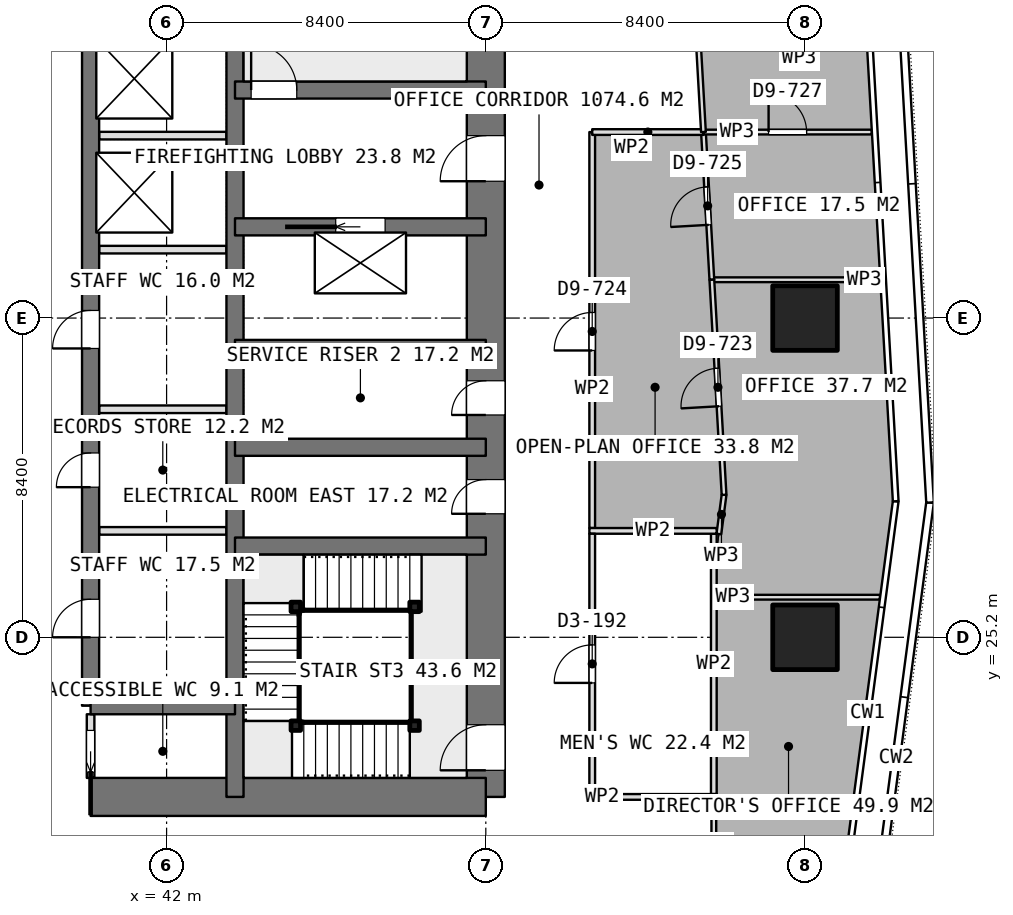
"""IFC4 building model, lengths in metres.
Left out: names, types, materials, properties, quantities, classifications, styles, units other than length and angle.
Written with IfcOpenShell. Run it as: python <this file> out.ifc"""

import sys

from ifc_helpers import new_model, si_unit, direction, frame, frame_2d, origin, origin_2d, place, context, subcontext, project, spatial, rectangle, extrude, element, fill, save


model = new_model("IFC4")
c1 = context("Model", 3, precision=1e-05, world=origin(), true_north=direction((0.0, 1.0)))
c2 = subcontext(c1, "Body", "Model", "MODEL_VIEW")
j1 = project(units=[si_unit("LENGTHUNIT", "METRE"), si_unit("PLANEANGLEUNIT", "RADIAN")], contexts=[c1])
p1 = place(None, origin())
s1 = spatial("IfcSite", under=j1, at=p1, CompositionType="ELEMENT")
p2 = place(p1, origin())
s2 = spatial("IfcBuilding", under=s1, at=p2, CompositionType="ELEMENT")
p3 = place(p2, frame((0.0, 0.0, 183.95)))
s3 = spatial("IfcBuildingStorey", under=s2, at=p3, CompositionType="ELEMENT", Elevation=183.95)
p4 = place(p3, frame((40.0, 21.0, 0.0), z_axis=(0.0, 0.0, 1.0), x_axis=(1.0, 0.0, 0.0)))
e1 = element("IfcWall", 1, at=p4, inside=s3, PredefinedType="SHEAR", context=c2, shape_type="SweptSolid", body=[
    extrude(rectangle(XDim=10.4, YDim=1.0, at=frame_2d((5.2, 0.0))), origin(), (0.0, 0.0, 1.0), 3.75),
])
p5 = place(p3, frame((50.4, 21.0, 0.0), z_axis=(0.0, 0.0, 1.0), x_axis=(0.0, 1.0, 0.0)))
e2 = element("IfcWall", 2, at=p5, inside=s3, PredefinedType="SHEAR", context=c2, shape_type="SweptSolid", body=[
    extrude(rectangle(XDim=25.2, YDim=1.0, at=frame_2d((12.6, 0.0))), origin(), (0.0, 0.0, 1.0), 3.75),
])
p6 = place(p5, frame((16.2, 0.0, 0.0)))
e3 = element("IfcOpeningElement", 3, at=p6, cuts=e2, PredefinedType="OPENING", context=c2, shape_type="SweptSolid", body=[
    extrude(rectangle(XDim=1.2, YDim=2.1, at=frame_2d((0.6, 1.05))), frame((0.0, 0.51, 0.0), z_axis=(0.0, -1.0, 0.0), x_axis=(1.0, 0.0, 0.0)), (0.0, 0.0, 1.0), 1.02),
])
p7 = place(p5, frame((10.05, 0.0, 0.0)))
e4 = element("IfcOpeningElement", 4, at=p7, cuts=e2, PredefinedType="OPENING", context=c2, shape_type="SweptSolid", body=[
    extrude(rectangle(XDim=0.9, YDim=2.1, at=frame_2d((0.45, 1.05))), frame((0.0, 0.51, 0.0), z_axis=(0.0, -1.0, 0.0), x_axis=(1.0, 0.0, 0.0)), (0.0, 0.0, 1.0), 1.02),
])
p8 = place(p5, frame((7.45, 0.0, 0.0)))
e5 = element("IfcOpeningElement", 5, at=p8, cuts=e2, PredefinedType="OPENING", context=c2, shape_type="SweptSolid", body=[
    extrude(rectangle(XDim=0.9, YDim=2.1, at=frame_2d((0.45, 1.05))), frame((0.0, 0.51, 0.0), z_axis=(0.0, -1.0, 0.0), x_axis=(1.0, 0.0, 0.0)), (0.0, 0.0, 1.0), 1.02),
])
p9 = place(p5, frame((0.7, 0.0, 0.0)))
e6 = element("IfcOpeningElement", 6, at=p9, cuts=e2, PredefinedType="OPENING", context=c2, shape_type="SweptSolid", body=[
    extrude(rectangle(XDim=1.2, YDim=2.1, at=frame_2d((0.6, 1.05))), frame((0.0, 0.51, 0.0), z_axis=(0.0, -1.0, 0.0), x_axis=(1.0, 0.0, 0.0)), (0.0, 0.0, 1.0), 1.02),
])
p10 = place(p3, frame((43.8, 21.0, 0.0), z_axis=(0.0, 0.0, 1.0), x_axis=(0.0, 1.0, 0.0)))
e7 = element("IfcWall", 7, at=p10, inside=s3, PredefinedType="SHEAR", context=c2, shape_type="SweptSolid", body=[
    extrude(rectangle(XDim=25.2, YDim=0.45, at=frame_2d((12.6, 0.0))), origin(), (0.0, 0.0, 1.0), 3.75),
])
p11 = place(p3, frame((40.0, 23.4, 0.0), z_axis=(0.0, 0.0, 1.0), x_axis=(0.0, 1.0, 0.0)))
e8 = element("IfcWall", 8, at=p11, inside=s3, PredefinedType="SHEAR", context=c2, shape_type="SweptSolid", body=[
    extrude(rectangle(XDim=18.0, YDim=0.45, at=frame_2d((9.0, 0.0))), origin(), (0.0, 0.0, 1.0), 3.75),
])
p12 = place(p11, frame((1.8, 0.0, 0.0)))
e9 = element("IfcOpeningElement", 9, at=p12, cuts=e8, PredefinedType="OPENING", context=c2, shape_type="SweptSolid", body=[
    extrude(rectangle(XDim=1.0, YDim=2.1, at=frame_2d((0.5, 1.05))), frame((0.0, 0.235, 0.0), z_axis=(0.0, -1.0, 0.0), x_axis=(1.0, 0.0, 0.0)), (0.0, 0.0, 1.0), 0.47),
])
p13 = place(p11, frame((5.75, 0.0, 0.0)))
e10 = element("IfcOpeningElement", 10, at=p13, cuts=e8, PredefinedType="OPENING", context=c2, shape_type="SweptSolid", body=[
    extrude(rectangle(XDim=0.9, YDim=2.1, at=frame_2d((0.45, 1.05))), frame((0.0, 0.235, 0.0), z_axis=(0.0, -1.0, 0.0), x_axis=(1.0, 0.0, 0.0)), (0.0, 0.0, 1.0), 0.47),
])
p14 = place(p11, frame((9.4, 0.0, 0.0)))
e11 = element("IfcOpeningElement", 11, at=p14, cuts=e8, PredefinedType="OPENING", context=c2, shape_type="SweptSolid", body=[
    extrude(rectangle(XDim=1.0, YDim=2.1, at=frame_2d((0.5, 1.05))), frame((0.0, 0.235, 0.0), z_axis=(0.0, -1.0, 0.0), x_axis=(1.0, 0.0, 0.0)), (0.0, 0.0, 1.0), 0.47),
])
p15 = place(p3, frame((40.0, 23.4, 0.0), z_axis=(0.0, 0.0, 1.0), x_axis=(1.0, 0.0, 0.0)))
e12 = element("IfcWall", 12, at=p15, inside=s3, PredefinedType="SHEAR", context=c2, shape_type="SweptSolid", body=[
    extrude(rectangle(XDim=3.8, YDim=0.45, at=frame_2d((1.9, 0.0))), origin(), (0.0, 0.0, 1.0), 3.75),
])
for number, where, z_axis, x_axis in (
    (13, (43.8, 27.6, 0.0), (0.0, 0.0, 1.0), (1.0, 0.0, 0.0)),
    (14, (43.8, 30.2, 0.0), (0.0, 0.0, 1.0), (1.0, 0.0, 0.0)),
    (15, (43.8, 32.8, 0.0), (0.0, 0.0, 1.0), (1.0, 0.0, 0.0)),
):
    element("IfcWall", number, at=place(p3, frame(where, z_axis=z_axis, x_axis=x_axis)), inside=s3, PredefinedType="SHEAR", context=c2, shape_type="SweptSolid", body=[
        extrude(rectangle(XDim=6.6, YDim=0.45, at=frame_2d((3.3, 0.0))), origin(), (0.0, 0.0, 1.0), 3.75),
    ])
p16 = place(p3, frame((43.8, 36.0, 0.0), z_axis=(0.0, 0.0, 1.0), x_axis=(1.0, 0.0, 0.0)))
e16 = element("IfcWall", 16, at=p16, inside=s3, PredefinedType="SHEAR", context=c2, shape_type="SweptSolid", body=[
    extrude(rectangle(XDim=6.6, YDim=0.45, at=frame_2d((3.3, 0.0))), origin(), (0.0, 0.0, 1.0), 3.75),
])
p17 = place(p16, frame((2.65, 0.0, 0.0)))
e17 = element("IfcOpeningElement", 17, at=p17, cuts=e16, PredefinedType="OPENING", context=c2, shape_type="SweptSolid", body=[
    extrude(rectangle(XDim=1.3, YDim=2.1, at=frame_2d((0.65, 1.05))), frame((0.0, 0.235, 0.0), z_axis=(0.0, -1.0, 0.0), x_axis=(1.0, 0.0, 0.0)), (0.0, 0.0, 1.0), 0.47),
])
p18 = place(p3, frame((43.8, 39.6, 0.0), z_axis=(0.0, 0.0, 1.0), x_axis=(1.0, 0.0, 0.0)))
e18 = element("IfcWall", 18, at=p18, inside=s3, PredefinedType="SHEAR", context=c2, shape_type="SweptSolid", body=[
    extrude(rectangle(XDim=6.6, YDim=0.45, at=frame_2d((3.3, 0.0))), origin(), (0.0, 0.0, 1.0), 3.75),
])
p19 = place(p18, frame((0.425, 0.0, 0.0)))
e19 = element("IfcOpeningElement", 19, at=p19, cuts=e18, PredefinedType="OPENING", context=c2, shape_type="SweptSolid", body=[
    extrude(rectangle(XDim=1.2, YDim=2.1, at=frame_2d((0.6, 1.05))), frame((0.0, 0.235, 0.0), z_axis=(0.0, -1.0, 0.0), x_axis=(1.0, 0.0, 0.0)), (0.0, 0.0, 1.0), 0.47),
])
for number, where, z_axis, x_axis in (
    (20, (58.8, 25.2, 0.0), (0.0, 0.0, 1.0), (1.0, 0.0, 0.0)),
    (21, (58.8, 33.6, 0.0), (0.0, 0.0, 1.0), (1.0, 0.0, 0.0)),
):
    element("IfcColumn", number, at=place(p3, frame(where, z_axis=z_axis, x_axis=x_axis)), inside=s3, PredefinedType="COLUMN", context=c2, shape_type="SweptSolid", body=[
        extrude(rectangle(XDim=1.7, YDim=1.7, at=origin_2d()), origin(), (0.0, 0.0, 1.0), 3.75),
    ])
for number, where, z_axis, x_axis in (
    (22, (40.225, 35.4, 0.0), (0.0, 0.0, 1.0), (1.0, 0.0, 0.0)),
    (23, (40.225, 38.4, 0.0), (0.0, 0.0, 1.0), (1.0, 0.0, 0.0)),
):
    element("IfcWall", number, at=place(p3, frame(where, z_axis=z_axis, x_axis=x_axis)), inside=s3, PredefinedType="PARTITIONING", context=c2, shape_type="SweptSolid", body=[
        extrude(rectangle(XDim=3.35, YDim=0.2, at=frame_2d((1.675, 0.0))), origin(), (0.0, 0.0, 1.0), 3.5),
    ])
p20 = place(p3, frame((40.0, 21.5, 0.0), z_axis=(0.0, 0.0, 1.0), x_axis=(0.0, 1.0, 0.0)))
e24 = element("IfcWall", 24, at=p20, inside=s3, PredefinedType="PARTITIONING", context=c2, shape_type="SweptSolid", body=[
    extrude(rectangle(XDim=1.675, YDim=0.2, at=frame_2d((0.837, 0.0))), origin(), (0.0, 0.0, 1.0), 3.5),
])
p21 = place(p20, frame((0.15, 0.0, 0.0)))
e25 = element("IfcOpeningElement", 25, at=p21, cuts=e24, PredefinedType="OPENING", context=c2, shape_type="SweptSolid", body=[
    extrude(rectangle(XDim=1.1, YDim=2.1, at=frame_2d((0.55, 1.05))), frame((0.0, 0.11, 0.0), z_axis=(0.0, -1.0, 0.0), x_axis=(1.0, 0.0, 0.0)), (0.0, 0.0, 1.0), 0.22),
])
for number, where, z_axis, x_axis in (
    (26, (40.225, 28.0, 0.0), (0.0, 0.0, 1.0), (1.0, 0.0, 0.0)),
    (27, (40.225, 31.2, 0.0), (0.0, 0.0, 1.0), (1.0, 0.0, 0.0)),
):
    element("IfcWall", number, at=place(p3, frame(where, z_axis=z_axis, x_axis=x_axis)), inside=s3, PredefinedType="PARTITIONING", context=c2, shape_type="SweptSolid", body=[
        extrude(rectangle(XDim=3.35, YDim=0.2, at=frame_2d((1.675, 0.0))), origin(), (0.0, 0.0, 1.0), 3.5),
    ])
for number, where, z_axis, x_axis in (
    (28, (53.125, 21.0, 0.0), (0.0, 0.0, 1.0), (1.0, 0.0, 0.0)),
    (29, (53.125, 28.0, 0.0), (0.0, 0.0, 1.0), (1.0, 0.0, 0.0)),
):
    element("IfcWall", number, at=place(p3, frame(where, z_axis=z_axis, x_axis=x_axis)), inside=s3, PredefinedType="PARTITIONING", context=c2, shape_type="SweptSolid", body=[
        extrude(rectangle(XDim=3.35, YDim=0.15, at=frame_2d((1.675, 0.0))), origin(), (0.0, 0.0, 1.0), 3.5),
    ])
p22 = place(p3, frame((53.2, 21.075, 0.0), z_axis=(0.0, 0.0, 1.0), x_axis=(0.0, 1.0, 0.0)))
e30 = element("IfcWall", 30, at=p22, inside=s3, PredefinedType="PARTITIONING", context=c2, shape_type="SweptSolid", body=[
    extrude(rectangle(XDim=6.85, YDim=0.15, at=frame_2d((3.425, 0.0))), origin(), (0.0, 0.0, 1.0), 3.5),
])
p23 = place(p22, frame((2.925, 0.0, 0.0)))
e31 = element("IfcOpeningElement", 31, at=p23, cuts=e30, PredefinedType="OPENING", context=c2, shape_type="SweptSolid", body=[
    extrude(rectangle(XDim=1.0, YDim=2.1, at=frame_2d((0.5, 1.05))), frame((0.0, 0.085, 0.0), z_axis=(0.0, -1.0, 0.0), x_axis=(1.0, 0.0, 0.0)), (0.0, 0.0, 1.0), 0.17),
])
p24 = place(p3, frame((56.4, 21.075, 0.0), z_axis=(0.0, 0.0, 1.0), x_axis=(0.0, 1.0, 0.0)))
e32 = element("IfcWall", 32, at=p24, inside=s3, PredefinedType="PARTITIONING", context=c2, shape_type="SweptSolid", body=[
    extrude(rectangle(XDim=6.85, YDim=0.15, at=frame_2d((3.425, 0.0))), origin(), (0.0, 0.0, 1.0), 3.5),
])
p25 = place(p3, frame((56.4, 18.4, 0.0), z_axis=(0.0, 0.0, 1.0), x_axis=(0.0, 1.0, 0.0)))
e33 = element("IfcWall", 33, at=p25, inside=s3, PredefinedType="PARTITIONING", context=c2, shape_type="SweptSolid", body=[
    extrude(rectangle(XDim=2.675, YDim=0.125, at=frame_2d((1.337, 0.0))), origin(), (0.0, 0.0, 1.0), 3.5),
])
p26 = place(p3, frame((56.475, 26.255, 0.0), z_axis=(0.0, 0.0, 1.0), x_axis=(1.0, 0.0, 0.0)))
e34 = element("IfcWall", 34, at=p26, inside=s3, PredefinedType="PARTITIONING", context=c2, shape_type="SweptSolid", body=[
    extrude(rectangle(XDim=4.296, YDim=0.125, at=frame_2d((2.148, 0.0))), origin(), (0.0, 0.0, 1.0), 3.5),
])
p27 = place(p3, frame((56.669, 28.949, 0.0), z_axis=(0.0, 0.0, 1.0), x_axis=(-0.05664130847, 0.998394592421, 0.0)))
e35 = element("IfcWall", 35, at=p27, inside=s3, PredefinedType="PARTITIONING", context=c2, shape_type="SweptSolid", body=[
    extrude(rectangle(XDim=5.668, YDim=0.125, at=frame_2d((2.834, 0.0))), origin(), (0.0, 0.0, 1.0), 3.5),
])
p28 = place(p27, frame((2.334, 0.0, 0.0)))
e36 = element("IfcOpeningElement", 36, at=p28, cuts=e35, PredefinedType="OPENING", context=c2, shape_type="SweptSolid", body=[
    extrude(rectangle(XDim=1.0, YDim=2.1, at=frame_2d((0.5, 1.05))), frame((0.0, 0.073, 0.0), z_axis=(0.0, -1.0, 0.0), x_axis=(1.0, 0.0, 0.0)), (0.0, 0.0, 1.0), 0.145),
])
p29 = place(p3, frame((56.348, 34.608, 0.0), z_axis=(0.0, 0.0, 1.0), x_axis=(1.0, 0.0, 0.0)))
e37 = element("IfcWall", 37, at=p29, inside=s3, PredefinedType="PARTITIONING", context=c2, shape_type="SweptSolid", body=[
    extrude(rectangle(XDim=4.457, YDim=0.125, at=frame_2d((2.229, 0.0))), origin(), (0.0, 0.0, 1.0), 3.5),
])
p30 = place(p3, frame((56.533, 27.918, 0.0), z_axis=(0.0, 0.0, 1.0), x_axis=(0.130764223689, 0.991413494866, 0.0)))
e38 = element("IfcWall", 38, at=p30, inside=s3, PredefinedType="PARTITIONING", context=c2, shape_type="SweptSolid", body=[
    extrude(rectangle(XDim=1.04, YDim=0.125, at=frame_2d((0.52, 0.0))), origin(), (0.0, 0.0, 1.0), 3.5),
])
p31 = place(p3, frame((56.348, 34.609, 0.0), z_axis=(0.0, 0.0, 1.0), x_axis=(-0.056779989764, 0.998386715037, 0.0)))
e39 = element("IfcWall", 39, at=p31, inside=s3, PredefinedType="PARTITIONING", context=c2, shape_type="SweptSolid", body=[
    extrude(rectangle(XDim=3.891, YDim=0.125, at=frame_2d((1.946, 0.0))), origin(), (0.0, 0.0, 1.0), 3.5),
])
p32 = place(p31, frame((1.446, 0.0, 0.0)))
e40 = element("IfcOpeningElement", 40, at=p32, cuts=e39, PredefinedType="OPENING", context=c2, shape_type="SweptSolid", body=[
    extrude(rectangle(XDim=1.0, YDim=2.1, at=frame_2d((0.5, 1.05))), frame((0.0, 0.073, 0.0), z_axis=(0.0, -1.0, 0.0), x_axis=(1.0, 0.0, 0.0)), (0.0, 0.0, 1.0), 0.145),
])
p33 = place(p3, frame((56.127, 38.494, 0.0), z_axis=(0.0, 0.0, 1.0), x_axis=(1.0, 0.0, 0.0)))
e41 = element("IfcWall", 41, at=p33, inside=s3, PredefinedType="PARTITIONING", context=c2, shape_type="SweptSolid", body=[
    extrude(rectangle(XDim=4.428, YDim=0.125, at=frame_2d((2.214, 0.0))), origin(), (0.0, 0.0, 1.0), 3.5),
])
p34 = place(p33, frame((1.714, 0.0, 0.0)))
e42 = element("IfcOpeningElement", 42, at=p34, cuts=e41, PredefinedType="OPENING", context=c2, shape_type="SweptSolid", body=[
    extrude(rectangle(XDim=1.0, YDim=2.1, at=frame_2d((0.5, 1.05))), frame((0.0, 0.073, 0.0), z_axis=(0.0, -1.0, 0.0), x_axis=(1.0, 0.0, 0.0)), (0.0, 0.0, 1.0), 0.145),
])
p35 = place(p3, frame((53.2, 28.075, 0.0), z_axis=(0.0, 0.0, 1.0), x_axis=(0.0, 1.0, 0.0)))
e43 = element("IfcWall", 43, at=p35, inside=s3, PredefinedType="PARTITIONING", context=c2, shape_type="SweptSolid", body=[
    extrude(rectangle(XDim=10.419, YDim=0.15, at=frame_2d((5.209, 0.0))), origin(), (0.0, 0.0, 1.0), 3.5),
])
p36 = place(p35, frame((4.672, 0.0, 0.0)))
e44 = element("IfcOpeningElement", 44, at=p36, cuts=e43, PredefinedType="OPENING", context=c2, shape_type="SweptSolid", body=[
    extrude(rectangle(XDim=1.0, YDim=2.1, at=frame_2d((0.5, 1.05))), frame((0.0, 0.085, 0.0), z_axis=(0.0, -1.0, 0.0), x_axis=(1.0, 0.0, 0.0)), (0.0, 0.0, 1.0), 0.17),
])
p37 = place(p3, frame((53.2, 38.494, 0.0), z_axis=(0.0, 0.0, 1.0), x_axis=(1.0, 0.0, 0.0)))
e45 = element("IfcWall", 45, at=p37, inside=s3, PredefinedType="PARTITIONING", context=c2, shape_type="SweptSolid", body=[
    extrude(rectangle(XDim=2.927, YDim=0.15, at=frame_2d((1.463, 0.0))), origin(), (0.0, 0.0, 1.0), 3.5),
])
p38 = place(p3, frame((56.127, 38.495, 0.0), z_axis=(0.0, 0.0, 1.0), x_axis=(-0.056546005431, 0.998399994626, 0.0)))
e46 = element("IfcWall", 46, at=p38, inside=s3, PredefinedType="PARTITIONING", context=c2, shape_type="SweptSolid", body=[
    extrude(rectangle(XDim=2.388, YDim=0.125, at=frame_2d((1.194, 0.0))), origin(), (0.0, 0.0, 1.0), 3.5),
])
for number, where, z_axis, x_axis in (
    (47, (48.525, 22.875, 0.0), (0.0, 0.0, 1.0), (1.0, 0.0, 0.0)),
    (48, (45.4, 22.875, 0.0), (0.0, 0.0, 1.0), (1.0, 0.0, 0.0)),
    (49, (45.4, 26.0, 0.0), (0.0, 0.0, 1.0), (1.0, 0.0, 0.0)),
    (50, (48.525, 26.0, 0.0), (0.0, 0.0, 1.0), (1.0, 0.0, 0.0)),
):
    element("IfcColumn", number, at=place(p3, frame(where, z_axis=z_axis, x_axis=x_axis)), inside=s3, PredefinedType="COLUMN", context=c2, shape_type="SweptSolid", body=[
        extrude(rectangle(XDim=0.25, YDim=0.25, at=origin_2d()), origin(), (0.0, 0.0, 1.0), 3.75),
    ])
p39 = place(p6, origin())
e51 = element("IfcDoor", 51, at=p39, inside=s3, OperationType="SINGLE_SWING_LEFT", PredefinedType="DOOR", context=c2, shape_type="SweptSolid", body=[
    extrude(rectangle(XDim=1.2, YDim=2.1, at=frame_2d((0.6, 1.05))), frame((0.0, 0.025, 0.0), z_axis=(0.0, -1.0, 0.0), x_axis=(1.0, 0.0, 0.0)), (0.0, 0.0, 1.0), 0.05),
])
fill(e3, e51)
p40 = place(p7, origin())
e52 = element("IfcDoor", 52, at=p40, inside=s3, OperationType="SINGLE_SWING_LEFT", PredefinedType="DOOR", context=c2, shape_type="SweptSolid", body=[
    extrude(rectangle(XDim=0.9, YDim=2.1, at=frame_2d((0.45, 1.05))), frame((0.0, 0.025, 0.0), z_axis=(0.0, -1.0, 0.0), x_axis=(1.0, 0.0, 0.0)), (0.0, 0.0, 1.0), 0.05),
])
fill(e4, e52)
p41 = place(p8, origin())
e53 = element("IfcDoor", 53, at=p41, inside=s3, OperationType="SINGLE_SWING_LEFT", PredefinedType="DOOR", context=c2, shape_type="SweptSolid", body=[
    extrude(rectangle(XDim=0.9, YDim=2.1, at=frame_2d((0.45, 1.05))), frame((0.0, 0.025, 0.0), z_axis=(0.0, -1.0, 0.0), x_axis=(1.0, 0.0, 0.0)), (0.0, 0.0, 1.0), 0.05),
])
fill(e5, e53)
p42 = place(p21, origin())
e54 = element("IfcDoor", 54, at=p42, inside=s3, OperationType="SLIDING_TO_LEFT", PredefinedType="DOOR", context=c2, shape_type="SweptSolid", body=[
    extrude(rectangle(XDim=1.1, YDim=2.1, at=frame_2d((0.55, 1.05))), frame((0.0, 0.025, 0.0), z_axis=(0.0, -1.0, 0.0), x_axis=(1.0, 0.0, 0.0)), (0.0, 0.0, 1.0), 0.05),
])
fill(e25, e54)
p43 = place(p12, origin())
e55 = element("IfcDoor", 55, at=p43, inside=s3, OperationType="SINGLE_SWING_LEFT", PredefinedType="DOOR", context=c2, shape_type="SweptSolid", body=[
    extrude(rectangle(XDim=1.0, YDim=2.1, at=frame_2d((0.5, 1.05))), frame((0.0, 0.025, 0.0), z_axis=(0.0, -1.0, 0.0), x_axis=(1.0, 0.0, 0.0)), (0.0, 0.0, 1.0), 0.05),
])
fill(e9, e55)
p44 = place(p13, origin())
e56 = element("IfcDoor", 56, at=p44, inside=s3, OperationType="SINGLE_SWING_LEFT", PredefinedType="DOOR", context=c2, shape_type="SweptSolid", body=[
    extrude(rectangle(XDim=0.9, YDim=2.1, at=frame_2d((0.45, 1.05))), frame((0.0, 0.025, 0.0), z_axis=(0.0, -1.0, 0.0), x_axis=(1.0, 0.0, 0.0)), (0.0, 0.0, 1.0), 0.05),
])
fill(e10, e56)
p45 = place(p14, origin())
e57 = element("IfcDoor", 57, at=p45, inside=s3, OperationType="SINGLE_SWING_LEFT", PredefinedType="DOOR", context=c2, shape_type="SweptSolid", body=[
    extrude(rectangle(XDim=1.0, YDim=2.1, at=frame_2d((0.5, 1.05))), frame((0.0, 0.025, 0.0), z_axis=(0.0, -1.0, 0.0), x_axis=(1.0, 0.0, 0.0)), (0.0, 0.0, 1.0), 0.05),
])
fill(e11, e57)
p46 = place(p17, origin())
e58 = element("IfcDoor", 58, at=p46, inside=s3, OperationType="SLIDING_TO_LEFT", PredefinedType="USERDEFINED", context=c2, shape_type="SweptSolid", body=[
    extrude(rectangle(XDim=1.3, YDim=2.1, at=frame_2d((0.65, 1.05))), frame((0.0, 0.025, 0.0), z_axis=(0.0, -1.0, 0.0), x_axis=(1.0, 0.0, 0.0)), (0.0, 0.0, 1.0), 0.05),
])
fill(e17, e58)
p47 = place(p23, origin())
e59 = element("IfcDoor", 59, at=p47, inside=s3, OperationType="SINGLE_SWING_LEFT", PredefinedType="DOOR", context=c2, shape_type="SweptSolid", body=[
    extrude(rectangle(XDim=1.0, YDim=2.1, at=frame_2d((0.5, 1.05))), frame((0.0, 0.025, 0.0), z_axis=(0.0, -1.0, 0.0), x_axis=(1.0, 0.0, 0.0)), (0.0, 0.0, 1.0), 0.05),
])
fill(e31, e59)
p48 = place(p28, origin())
e60 = element("IfcDoor", 60, at=p48, inside=s3, OperationType="SINGLE_SWING_LEFT", PredefinedType="DOOR", context=c2, shape_type="SweptSolid", body=[
    extrude(rectangle(XDim=1.0, YDim=2.1, at=frame_2d((0.5, 1.05))), frame((0.0, 0.025, 0.0), z_axis=(0.0, -1.0, 0.0), x_axis=(1.0, 0.0, 0.0)), (0.0, 0.0, 1.0), 0.05),
])
fill(e36, e60)
p49 = place(p32, origin())
e61 = element("IfcDoor", 61, at=p49, inside=s3, OperationType="SINGLE_SWING_LEFT", PredefinedType="DOOR", context=c2, shape_type="SweptSolid", body=[
    extrude(rectangle(XDim=1.0, YDim=2.1, at=frame_2d((0.5, 1.05))), frame((0.0, 0.025, 0.0), z_axis=(0.0, -1.0, 0.0), x_axis=(1.0, 0.0, 0.0)), (0.0, 0.0, 1.0), 0.05),
])
fill(e40, e61)
p50 = place(p36, origin())
e62 = element("IfcDoor", 62, at=p50, inside=s3, OperationType="SINGLE_SWING_LEFT", PredefinedType="DOOR", context=c2, shape_type="SweptSolid", body=[
    extrude(rectangle(XDim=1.0, YDim=2.1, at=frame_2d((0.5, 1.05))), frame((0.0, 0.025, 0.0), z_axis=(0.0, -1.0, 0.0), x_axis=(1.0, 0.0, 0.0)), (0.0, 0.0, 1.0), 0.05),
])
fill(e44, e62)
p51 = place(p34, origin())
e63 = element("IfcDoor", 63, at=p51, inside=s3, OperationType="SINGLE_SWING_LEFT", PredefinedType="DOOR", context=c2, shape_type="SweptSolid", body=[
    extrude(rectangle(XDim=1.0, YDim=2.1, at=frame_2d((0.5, 1.05))), frame((0.0, 0.025, 0.0), z_axis=(0.0, -1.0, 0.0), x_axis=(1.0, 0.0, 0.0)), (0.0, 0.0, 1.0), 0.05),
])
fill(e42, e63)
p52 = place(p19, origin())
e64 = element("IfcDoor", 64, at=p52, inside=s3, OperationType="SINGLE_SWING_RIGHT", PredefinedType="DOOR", context=c2, shape_type="SweptSolid", body=[
    extrude(rectangle(XDim=1.2, YDim=2.1, at=frame_2d((0.6, 1.05))), frame((0.0, 0.025, 0.0), z_axis=(0.0, -1.0, 0.0), x_axis=(1.0, 0.0, 0.0)), (0.0, 0.0, 1.0), 0.05),
])
fill(e19, e64)
p53 = place(p9, origin())
e65 = element("IfcDoor", 65, at=p53, inside=s3, OperationType="SINGLE_SWING_RIGHT", PredefinedType="DOOR", context=c2, shape_type="SweptSolid", body=[
    extrude(rectangle(XDim=1.2, YDim=2.1, at=frame_2d((0.6, 1.05))), frame((0.0, 0.025, 0.0), z_axis=(0.0, -1.0, 0.0), x_axis=(1.0, 0.0, 0.0)), (0.0, 0.0, 1.0), 0.05),
])
fill(e6, e65)
save(model, sys.argv[1])
